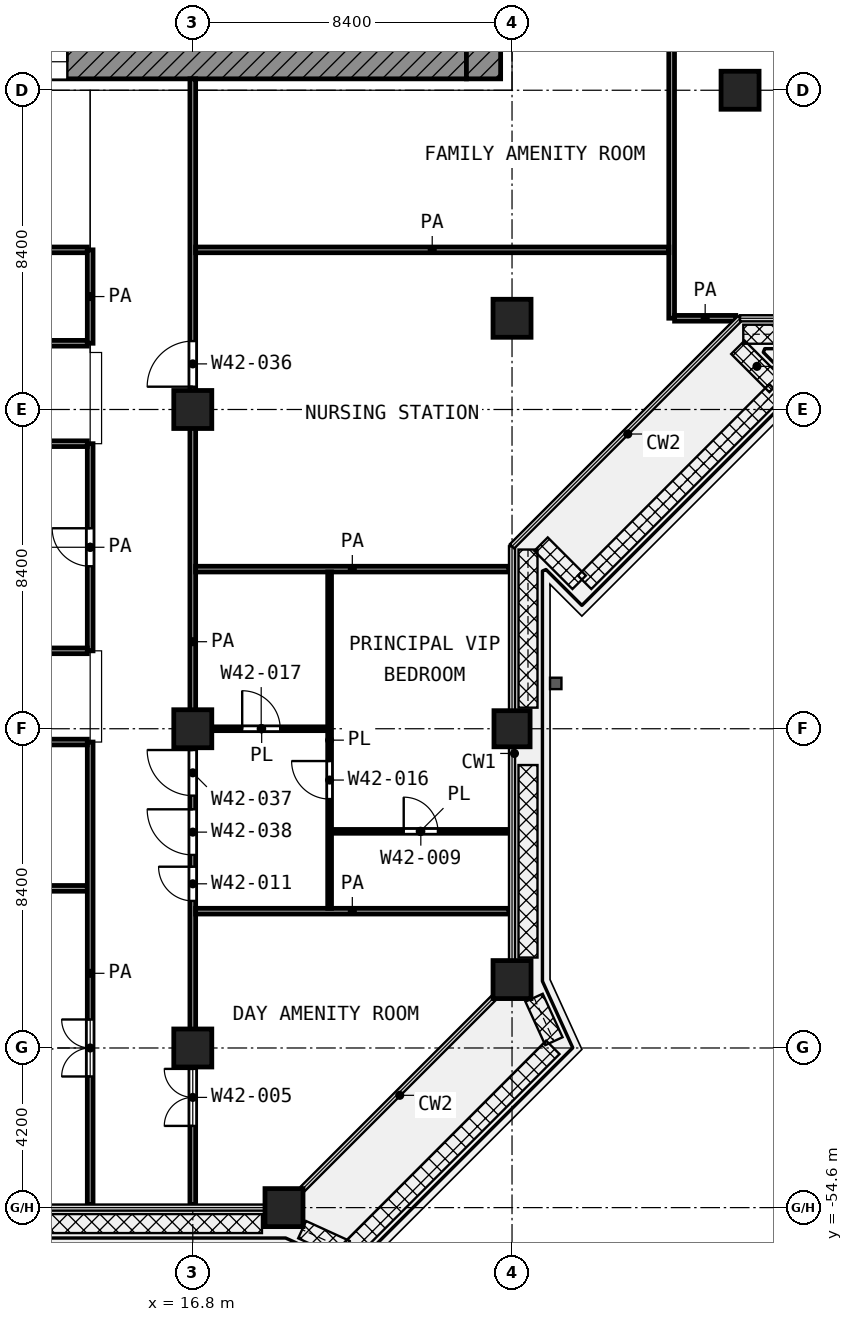
"""IFC4 building model, lengths in metres.
Left out: names, types, materials, properties, quantities, classifications, styles, units other than length and angle.
Written with IfcOpenShell. Run it as: python <this file> out.ifc"""

import sys

from ifc_helpers import new_model, si_unit, direction, frame, frame_2d, origin, origin_2d, place, context, subcontext, project, spatial, rectangle, extrude, element, fill, save


model = new_model("IFC4")
c1 = context("Model", 3, precision=1e-05, world=origin(), true_north=direction((0.0, 1.0)))
c2 = subcontext(c1, "Body", "Model", "MODEL_VIEW")
j1 = project(units=[si_unit("LENGTHUNIT", "METRE"), si_unit("PLANEANGLEUNIT", "RADIAN")], contexts=[c1])
p1 = place(None, origin())
s1 = spatial("IfcSite", under=j1, at=p1, CompositionType="ELEMENT")
p2 = place(p1, origin())
s2 = spatial("IfcBuilding", under=s1, at=p2, CompositionType="ELEMENT")
p3 = place(p2, frame((0.0, 0.0, 204.6)))
s3 = spatial("IfcBuildingStorey", under=s2, at=p3, CompositionType="ELEMENT", Elevation=204.6)
for number, where, z_axis, x_axis in (
    (1, (31.2, -25.2, 0.0), (0.0, 0.0, 1.0), (1.0, 0.0, 0.0)),
    (2, (25.2, -31.2, 0.0), (0.0, 0.0, 1.0), (1.0, 0.0, 0.0)),
    (3, (16.8, -33.6, 0.0), (0.0, 0.0, 1.0), (1.0, 0.0, 0.0)),
    (4, (16.8, -42.0, 0.0), (0.0, 0.0, 1.0), (1.0, 0.0, 0.0)),
):
    element("IfcColumn", number, at=place(p3, frame(where, z_axis=z_axis, x_axis=x_axis)), inside=s3, PredefinedType="COLUMN", context=c2, shape_type="SweptSolid", body=[
        extrude(rectangle(XDim=1.0, YDim=1.0, at=origin_2d()), origin(), (0.0, 0.0, 1.0), 4.2),
    ])
p4 = place(p3, frame((25.2, -42.0, 0.0), z_axis=(0.0, 0.0, 1.0), x_axis=(1.0, 0.0, 0.0)))
e5 = element("IfcColumn", 5, at=p4, inside=s3, PredefinedType="COLUMN", context=c2, shape_type="SweptSolid", body=[
    extrude(rectangle(XDim=0.95, YDim=0.95, at=origin_2d()), origin(), (0.0, 0.0, 1.0), 4.2),
])
for number, where, z_axis, x_axis in (
    (6, (25.2, -48.6, 0.0), (0.0, 0.0, 1.0), (1.0, 0.0, 0.0)),
    (7, (16.8, -50.4, 0.0), (0.0, 0.0, 1.0), (1.0, 0.0, 0.0)),
    (8, (19.2, -54.6, 0.0), (0.0, 0.0, 1.0), (1.0, 0.0, 0.0)),
):
    element("IfcColumn", number, at=place(p3, frame(where, z_axis=z_axis, x_axis=x_axis)), inside=s3, PredefinedType="COLUMN", context=c2, shape_type="SweptSolid", body=[
        extrude(rectangle(XDim=1.0, YDim=1.0, at=origin_2d()), origin(), (0.0, 0.0, 1.0), 4.2),
    ])
p5 = place(p3, frame((5.4, -24.45, 0.0), z_axis=(0.0, 0.0, 1.0), x_axis=(1.0, 0.0, 0.0)))
e9 = element("IfcWall", 9, at=p5, inside=s3, PredefinedType="SHEAR", context=c2, shape_type="SweptSolid", body=[
    extrude(rectangle(XDim=18.6, YDim=0.9, at=frame_2d((9.3, 0.0))), origin(), (0.0, 0.0, 1.0), 3.6),
])
p6 = place(p5, frame((6.3, 0.0, 0.0)))
e10 = element("IfcOpeningElement", 10, at=p6, cuts=e9, PredefinedType="OPENING", context=c2, shape_type="SweptSolid", body=[
    extrude(rectangle(XDim=1.8, YDim=2.1, at=frame_2d((0.9, 1.05))), frame((0.0, 0.46, 0.0), z_axis=(0.0, -1.0, 0.0), x_axis=(1.0, 0.0, 0.0)), (0.0, 0.0, 1.0), 0.92),
])
p7 = place(p3, frame((24.45, -24.9, 0.0), z_axis=(0.0, 0.0, 1.0), x_axis=(0.0, 1.0, 0.0)))
e11 = element("IfcWall", 11, at=p7, inside=s3, PredefinedType="SHEAR", context=c2, shape_type="SweptSolid", body=[
    extrude(rectangle(XDim=0.9, YDim=0.9, at=frame_2d((0.45, 0.0))), origin(), (0.0, 0.0, 1.0), 3.6),
])
p8 = place(p3, frame((20.45, -44.7, 0.0), z_axis=(0.0, 0.0, 1.0), x_axis=(1.0, 0.0, 0.0)))
e12 = element("IfcWall", 12, at=p8, inside=s3, PredefinedType="PARTITIONING", context=c2, shape_type="SweptSolid", body=[
    extrude(rectangle(XDim=4.67, YDim=0.1, at=frame_2d((2.335, 0.0))), origin(), (0.0, 0.0, 1.0), 3.6),
])
p9 = place(p8, frame((1.9, 0.0, 0.0)))
e13 = element("IfcOpeningElement", 13, at=p9, cuts=e12, PredefinedType="OPENING", context=c2, shape_type="SweptSolid", body=[
    extrude(rectangle(XDim=0.9, YDim=2.1, at=frame_2d((0.45, 1.05))), frame((0.0, 0.06, 0.0), z_axis=(0.0, -1.0, 0.0), x_axis=(1.0, 0.0, 0.0)), (0.0, 0.0, 1.0), 0.12),
])
p10 = place(p3, frame((16.875, -42.0, 0.0), z_axis=(0.0, 0.0, 1.0), x_axis=(1.0, 0.0, 0.0)))
e14 = element("IfcWall", 14, at=p10, inside=s3, PredefinedType="PARTITIONING", context=c2, shape_type="SweptSolid", body=[
    extrude(rectangle(XDim=3.475, YDim=0.1, at=frame_2d((1.738, 0.0))), origin(), (0.0, 0.0, 1.0), 3.6),
])
p11 = place(p10, frame((1.225, 0.0, 0.0)))
e15 = element("IfcOpeningElement", 15, at=p11, cuts=e14, PredefinedType="OPENING", context=c2, shape_type="SweptSolid", body=[
    extrude(rectangle(XDim=1.0, YDim=2.1, at=frame_2d((0.5, 1.05))), frame((0.0, 0.06, 0.0), z_axis=(0.0, -1.0, 0.0), x_axis=(1.0, 0.0, 0.0)), (0.0, 0.0, 1.0), 0.12),
])
p12 = place(p3, frame((20.4, -46.725, 0.0), z_axis=(0.0, 0.0, 1.0), x_axis=(0.0, 1.0, 0.0)))
e16 = element("IfcWall", 16, at=p12, inside=s3, PredefinedType="PARTITIONING", context=c2, shape_type="SweptSolid", body=[
    extrude(rectangle(XDim=8.85, YDim=0.1, at=frame_2d((4.425, 0.0))), origin(), (0.0, 0.0, 1.0), 3.6),
])
p13 = place(p12, frame((2.875, 0.0, 0.0)))
e17 = element("IfcOpeningElement", 17, at=p13, cuts=e16, PredefinedType="OPENING", context=c2, shape_type="SweptSolid", body=[
    extrude(rectangle(XDim=1.0, YDim=2.1, at=frame_2d((0.5, 1.05))), frame((0.0, 0.06, 0.0), z_axis=(0.0, -1.0, 0.0), x_axis=(1.0, 0.0, 0.0)), (0.0, 0.0, 1.0), 0.12),
])
p14 = place(p3, frame((16.875, -46.8, 0.0), z_axis=(0.0, 0.0, 1.0), x_axis=(1.0, 0.0, 0.0)))
e18 = element("IfcWall", 18, at=p14, inside=s3, PredefinedType="PARTITIONING", context=c2, shape_type="SweptSolid", body=[
    extrude(rectangle(XDim=8.245, YDim=0.15, at=frame_2d((4.123, 0.0))), origin(), (0.0, 0.0, 1.0), 3.6),
])
p15 = place(p3, frame((0.08, -46.2, 0.0), z_axis=(0.0, 0.0, 1.0), x_axis=(1.0, 0.0, 0.0)))
e19 = element("IfcWall", 19, at=p15, inside=s3, PredefinedType="PARTITIONING", context=c2, shape_type="SweptSolid", body=[
    extrude(rectangle(XDim=13.945, YDim=0.15, at=frame_2d((6.972, 0.0))), origin(), (0.0, 0.0, 1.0), 3.6),
])
p16 = place(p3, frame((2.326, -42.35, 0.0), z_axis=(0.0, 0.0, 1.0), x_axis=(1.0, 0.0, 0.0)))
e20 = element("IfcWall", 20, at=p16, inside=s3, PredefinedType="PARTITIONING", context=c2, shape_type="SweptSolid", body=[
    extrude(rectangle(XDim=11.699, YDim=0.15, at=frame_2d((5.85, 0.0))), origin(), (0.0, 0.0, 1.0), 3.6),
])
p17 = place(p16, frame((4.349, 0.0, 0.0)))
e21 = element("IfcOpeningElement", 21, at=p17, cuts=e20, PredefinedType="OPENING", context=c2, shape_type="SweptSolid", body=[
    extrude(rectangle(XDim=1.2, YDim=2.1, at=frame_2d((0.6, 1.05))), frame((0.0, 0.085, 0.0), z_axis=(0.0, -1.0, 0.0), x_axis=(1.0, 0.0, 0.0)), (0.0, 0.0, 1.0), 0.17),
])
p18 = place(p3, frame((8.65, -39.95, 0.0), z_axis=(0.0, 0.0, 1.0), x_axis=(1.0, 0.0, 0.0)))
e22 = element("IfcWall", 22, at=p18, inside=s3, PredefinedType="PARTITIONING", context=c2, shape_type="SweptSolid", body=[
    extrude(rectangle(XDim=5.375, YDim=0.15, at=frame_2d((2.688, 0.0))), origin(), (0.0, 0.0, 1.0), 3.6),
])
p19 = place(p3, frame((16.875, -37.8, 0.0), z_axis=(0.0, 0.0, 1.0), x_axis=(1.0, 0.0, 0.0)))
e23 = element("IfcWall", 23, at=p19, inside=s3, PredefinedType="PARTITIONING", context=c2, shape_type="SweptSolid", body=[
    extrude(rectangle(XDim=8.245, YDim=0.15, at=frame_2d((4.123, 0.0))), origin(), (0.0, 0.0, 1.0), 3.6),
])
p20 = place(p3, frame((8.9, -34.5, 0.0), z_axis=(0.0, 0.0, 1.0), x_axis=(1.0, 0.0, 0.0)))
e24 = element("IfcWall", 24, at=p20, inside=s3, PredefinedType="PARTITIONING", context=c2, shape_type="SweptSolid", body=[
    extrude(rectangle(XDim=5.125, YDim=0.15, at=frame_2d((2.562, 0.0))), origin(), (0.0, 0.0, 1.0), 3.6),
])
p21 = place(p3, frame((1.077, -31.857, 0.0), z_axis=(0.0, 0.0, 1.0), x_axis=(1.0, 0.0, 0.0)))
e25 = element("IfcWall", 25, at=p21, inside=s3, PredefinedType="PARTITIONING", context=c2, shape_type="SweptSolid", body=[
    extrude(rectangle(XDim=12.948, YDim=0.15, at=frame_2d((6.474, 0.0))), origin(), (0.0, 0.0, 1.0), 3.6),
])
p22 = place(p21, frame((5.574, 0.0, 0.0)))
e26 = element("IfcOpeningElement", 26, at=p22, cuts=e25, PredefinedType="OPENING", context=c2, shape_type="SweptSolid", body=[
    extrude(rectangle(XDim=1.2, YDim=2.1, at=frame_2d((0.6, 1.05))), frame((0.0, 0.085, 0.0), z_axis=(0.0, -1.0, 0.0), x_axis=(1.0, 0.0, 0.0)), (0.0, 0.0, 1.0), 0.17),
])
p23 = place(p3, frame((29.477, -31.2, 0.0), z_axis=(0.0, 0.0, 1.0), x_axis=(1.0, 0.0, 0.0)))
e27 = element("IfcWall", 27, at=p23, inside=s3, PredefinedType="PARTITIONING", context=c2, shape_type="SweptSolid", body=[
    extrude(rectangle(XDim=1.61, YDim=0.15, at=frame_2d((0.805, 0.0))), origin(), (0.0, 0.0, 1.0), 3.6),
])
p24 = place(p3, frame((11.177, -29.4, 0.0), z_axis=(0.0, 0.0, 1.0), x_axis=(1.0, 0.0, 0.0)))
e28 = element("IfcWall", 28, at=p24, inside=s3, PredefinedType="PARTITIONING", context=c2, shape_type="SweptSolid", body=[
    extrude(rectangle(XDim=2.848, YDim=0.15, at=frame_2d((1.424, 0.0))), origin(), (0.0, 0.0, 1.0), 3.6),
])
p25 = place(p3, frame((16.875, -29.4, 0.0), z_axis=(0.0, 0.0, 1.0), x_axis=(1.0, 0.0, 0.0)))
e29 = element("IfcWall", 29, at=p25, inside=s3, PredefinedType="PARTITIONING", context=c2, shape_type="SweptSolid", body=[
    extrude(rectangle(XDim=12.45, YDim=0.15, at=frame_2d((6.225, 0.0))), origin(), (0.0, 0.0, 1.0), 3.6),
])
p26 = place(p3, frame((14.1, -54.52, 0.0), z_axis=(0.0, 0.0, 1.0), x_axis=(0.0, 1.0, 0.0)))
e30 = element("IfcWall", 30, at=p26, inside=s3, PredefinedType="PARTITIONING", context=c2, shape_type="SweptSolid", body=[
    extrude(rectangle(XDim=12.17, YDim=0.15, at=frame_2d((6.085, 0.0))), origin(), (0.0, 0.0, 1.0), 3.6),
])
p27 = place(p26, frame((3.37, 0.0, 0.0)))
e31 = element("IfcOpeningElement", 31, at=p27, cuts=e30, PredefinedType="OPENING", context=c2, shape_type="SweptSolid", body=[
    extrude(rectangle(XDim=1.5, YDim=2.1, at=frame_2d((0.75, 1.05))), frame((0.0, 0.085, 0.0), z_axis=(0.0, -1.0, 0.0), x_axis=(1.0, 0.0, 0.0)), (0.0, 0.0, 1.0), 0.17),
])
p28 = place(p3, frame((14.1, -39.95, 0.0), z_axis=(0.0, 0.0, 1.0), x_axis=(0.0, 1.0, 0.0)))
e32 = element("IfcWall", 32, at=p28, inside=s3, PredefinedType="PARTITIONING", context=c2, shape_type="SweptSolid", body=[
    extrude(rectangle(XDim=5.45, YDim=0.15, at=frame_2d((2.725, 0.0))), origin(), (0.0, 0.0, 1.0), 3.6),
])
p29 = place(p28, frame((2.225, 0.0, 0.0)))
e33 = element("IfcOpeningElement", 33, at=p29, cuts=e32, PredefinedType="OPENING", context=c2, shape_type="SweptSolid", body=[
    extrude(rectangle(XDim=1.0, YDim=2.1, at=frame_2d((0.5, 1.05))), frame((0.0, 0.085, 0.0), z_axis=(0.0, -1.0, 0.0), x_axis=(1.0, 0.0, 0.0)), (0.0, 0.0, 1.0), 0.17),
])
p30 = place(p3, frame((14.1, -31.857, 0.0), z_axis=(0.0, 0.0, 1.0), x_axis=(0.0, 1.0, 0.0)))
e34 = element("IfcWall", 34, at=p30, inside=s3, PredefinedType="PARTITIONING", context=c2, shape_type="SweptSolid", body=[
    extrude(rectangle(XDim=2.457, YDim=0.15, at=frame_2d((1.229, 0.0))), origin(), (0.0, 0.0, 1.0), 3.6),
])
p31 = place(p3, frame((16.8, -54.52, 0.0), z_axis=(0.0, 0.0, 1.0), x_axis=(0.0, 1.0, 0.0)))
e35 = element("IfcWall", 35, at=p31, inside=s3, PredefinedType="PARTITIONING", context=c2, shape_type="SweptSolid", body=[
    extrude(rectangle(XDim=29.62, YDim=0.15, at=frame_2d((14.81, 0.0))), origin(), (0.0, 0.0, 1.0), 3.6),
])
p32 = place(p31, frame((21.52, 0.0, 0.0)))
e36 = element("IfcOpeningElement", 36, at=p32, cuts=e35, PredefinedType="OPENING", context=c2, shape_type="SweptSolid", body=[
    extrude(rectangle(XDim=1.2, YDim=2.1, at=frame_2d((0.6, 1.05))), frame((0.0, 0.085, 0.0), z_axis=(0.0, -1.0, 0.0), x_axis=(1.0, 0.0, 0.0)), (0.0, 0.0, 1.0), 0.17),
])
p33 = place(p31, frame((10.76, 0.0, 0.0)))
e37 = element("IfcOpeningElement", 37, at=p33, cuts=e35, PredefinedType="OPENING", context=c2, shape_type="SweptSolid", body=[
    extrude(rectangle(XDim=1.2, YDim=2.1, at=frame_2d((0.6, 1.05))), frame((0.0, 0.085, 0.0), z_axis=(0.0, -1.0, 0.0), x_axis=(1.0, 0.0, 0.0)), (0.0, 0.0, 1.0), 0.17),
])
p34 = place(p31, frame((9.2, 0.0, 0.0)))
e38 = element("IfcOpeningElement", 38, at=p34, cuts=e35, PredefinedType="OPENING", context=c2, shape_type="SweptSolid", body=[
    extrude(rectangle(XDim=1.2, YDim=2.1, at=frame_2d((0.6, 1.05))), frame((0.0, 0.085, 0.0), z_axis=(0.0, -1.0, 0.0), x_axis=(1.0, 0.0, 0.0)), (0.0, 0.0, 1.0), 0.17),
])
p35 = place(p31, frame((7.99, 0.0, 0.0)))
e39 = element("IfcOpeningElement", 39, at=p35, cuts=e35, PredefinedType="OPENING", context=c2, shape_type="SweptSolid", body=[
    extrude(rectangle(XDim=0.9, YDim=2.1, at=frame_2d((0.45, 1.05))), frame((0.0, 0.085, 0.0), z_axis=(0.0, -1.0, 0.0), x_axis=(1.0, 0.0, 0.0)), (0.0, 0.0, 1.0), 0.17),
])
p36 = place(p31, frame((2.07, 0.0, 0.0)))
e40 = element("IfcOpeningElement", 40, at=p36, cuts=e35, PredefinedType="OPENING", context=c2, shape_type="SweptSolid", body=[
    extrude(rectangle(XDim=1.5, YDim=2.1, at=frame_2d((0.75, 1.05))), frame((0.0, 0.085, 0.0), z_axis=(0.0, -1.0, 0.0), x_axis=(1.0, 0.0, 0.0)), (0.0, 0.0, 1.0), 0.17),
])
p37 = place(p3, frame((29.4, -31.198, 0.0), z_axis=(0.0, 0.0, 1.0), x_axis=(0.0, 1.0, 0.0)))
e41 = element("IfcWall", 41, at=p37, inside=s3, PredefinedType="PARTITIONING", context=c2, shape_type="SweptSolid", body=[
    extrude(rectangle(XDim=14.323, YDim=0.15, at=frame_2d((7.162, 0.0))), origin(), (0.0, 0.0, 1.0), 3.6),
])
p38 = place(p6, origin())
e42 = element("IfcDoor", 42, at=p38, inside=s3, OperationType="DOUBLE_DOOR_SINGLE_SWING", PredefinedType="DOOR", context=c2, shape_type="SweptSolid", body=[
    extrude(rectangle(XDim=1.8, YDim=2.1, at=frame_2d((0.9, 1.05))), frame((0.0, 0.025, 0.0), z_axis=(0.0, -1.0, 0.0), x_axis=(1.0, 0.0, 0.0)), (0.0, 0.0, 1.0), 0.05),
])
fill(e10, e42)
p39 = place(p29, origin())
e43 = element("IfcDoor", 43, at=p39, inside=s3, OperationType="SINGLE_SWING_RIGHT", PredefinedType="DOOR", context=c2, shape_type="SweptSolid", body=[
    extrude(rectangle(XDim=1.0, YDim=2.1, at=frame_2d((0.5, 1.05))), frame((0.0, 0.025, 0.0), z_axis=(0.0, -1.0, 0.0), x_axis=(1.0, 0.0, 0.0)), (0.0, 0.0, 1.0), 0.05),
])
fill(e33, e43)
p40 = place(p27, origin())
e44 = element("IfcDoor", 44, at=p40, inside=s3, OperationType="DOUBLE_DOOR_SINGLE_SWING", PredefinedType="DOOR", context=c2, shape_type="SweptSolid", body=[
    extrude(rectangle(XDim=1.5, YDim=2.1, at=frame_2d((0.75, 1.05))), frame((0.0, 0.025, 0.0), z_axis=(0.0, -1.0, 0.0), x_axis=(1.0, 0.0, 0.0)), (0.0, 0.0, 1.0), 0.05),
])
fill(e31, e44)
p41 = place(p32, origin())
e45 = element("IfcDoor", 45, at=p41, inside=s3, OperationType="SINGLE_SWING_LEFT", PredefinedType="DOOR", context=c2, shape_type="SweptSolid", body=[
    extrude(rectangle(XDim=1.2, YDim=2.1, at=frame_2d((0.6, 1.05))), frame((0.0, 0.025, 0.0), z_axis=(0.0, -1.0, 0.0), x_axis=(1.0, 0.0, 0.0)), (0.0, 0.0, 1.0), 0.05),
])
fill(e36, e45)
p42 = place(p33, origin())
e46 = element("IfcDoor", 46, at=p42, inside=s3, OperationType="SINGLE_SWING_RIGHT", PredefinedType="DOOR", context=c2, shape_type="SweptSolid", body=[
    extrude(rectangle(XDim=1.2, YDim=2.1, at=frame_2d((0.6, 1.05))), frame((0.0, 0.025, 0.0), z_axis=(0.0, -1.0, 0.0), x_axis=(1.0, 0.0, 0.0)), (0.0, 0.0, 1.0), 0.05),
])
fill(e37, e46)
p43 = place(p34, origin())
e47 = element("IfcDoor", 47, at=p43, inside=s3, OperationType="SINGLE_SWING_RIGHT", PredefinedType="DOOR", context=c2, shape_type="SweptSolid", body=[
    extrude(rectangle(XDim=1.2, YDim=2.1, at=frame_2d((0.6, 1.05))), frame((0.0, 0.025, 0.0), z_axis=(0.0, -1.0, 0.0), x_axis=(1.0, 0.0, 0.0)), (0.0, 0.0, 1.0), 0.05),
])
fill(e38, e47)
p44 = place(p35, origin())
e48 = element("IfcDoor", 48, at=p44, inside=s3, OperationType="SINGLE_SWING_RIGHT", PredefinedType="DOOR", context=c2, shape_type="SweptSolid", body=[
    extrude(rectangle(XDim=0.9, YDim=2.1, at=frame_2d((0.45, 1.05))), frame((0.0, 0.025, 0.0), z_axis=(0.0, -1.0, 0.0), x_axis=(1.0, 0.0, 0.0)), (0.0, 0.0, 1.0), 0.05),
])
fill(e39, e48)
p45 = place(p13, origin())
e49 = element("IfcDoor", 49, at=p45, inside=s3, OperationType="SINGLE_SWING_RIGHT", PredefinedType="DOOR", context=c2, shape_type="SweptSolid", body=[
    extrude(rectangle(XDim=1.0, YDim=2.1, at=frame_2d((0.5, 1.05))), frame((0.0, 0.025, 0.0), z_axis=(0.0, -1.0, 0.0), x_axis=(1.0, 0.0, 0.0)), (0.0, 0.0, 1.0), 0.05),
])
fill(e17, e49)
p46 = place(p11, origin())
e50 = element("IfcDoor", 50, at=p46, inside=s3, OperationType="SINGLE_SWING_LEFT", PredefinedType="DOOR", context=c2, shape_type="SweptSolid", body=[
    extrude(rectangle(XDim=1.0, YDim=2.1, at=frame_2d((0.5, 1.05))), frame((0.0, 0.025, 0.0), z_axis=(0.0, -1.0, 0.0), x_axis=(1.0, 0.0, 0.0)), (0.0, 0.0, 1.0), 0.05),
])
fill(e15, e50)
p47 = place(p9, origin())
e51 = element("IfcDoor", 51, at=p47, inside=s3, OperationType="SINGLE_SWING_LEFT", PredefinedType="DOOR", context=c2, shape_type="SweptSolid", body=[
    extrude(rectangle(XDim=0.9, YDim=2.1, at=frame_2d((0.45, 1.05))), frame((0.0, 0.025, 0.0), z_axis=(0.0, -1.0, 0.0), x_axis=(1.0, 0.0, 0.0)), (0.0, 0.0, 1.0), 0.05),
])
fill(e13, e51)
p48 = place(p36, origin())
e52 = element("IfcDoor", 52, at=p48, inside=s3, OperationType="DOUBLE_DOOR_SINGLE_SWING", PredefinedType="DOOR", context=c2, shape_type="SweptSolid", body=[
    extrude(rectangle(XDim=1.5, YDim=2.1, at=frame_2d((0.75, 1.05))), frame((0.0, 0.025, 0.0), z_axis=(0.0, -1.0, 0.0), x_axis=(1.0, 0.0, 0.0)), (0.0, 0.0, 1.0), 0.05),
])
fill(e40, e52)
save(model, sys.argv[1])
